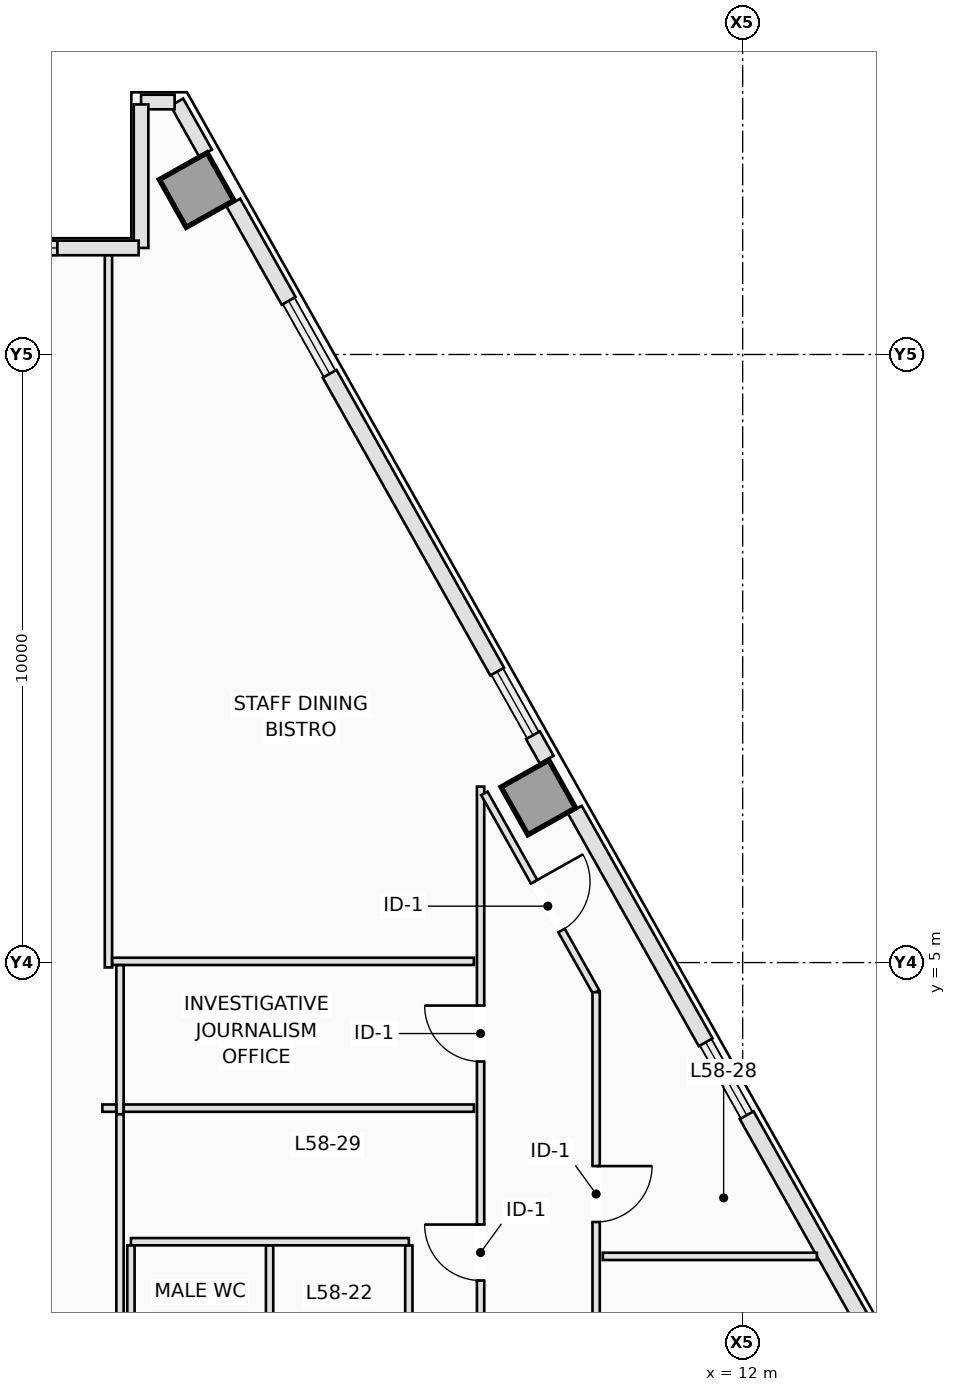
"""IFC4 building model, lengths in metres.
Left out: names, types, materials, properties, quantities, classifications, styles, units other than length and angle.
Written with IfcOpenShell. Run it as: python <this file> out.ifc"""

import sys

from ifc_helpers import new_model, si_unit, direction, frame, frame_2d, origin, origin_2d, place, context, subcontext, project, spatial, rectangle, extrude, element, fill, save


model = new_model("IFC4")
c1 = context("Model", 3, precision=1e-05, world=origin(), true_north=direction((0.0, 1.0)))
c2 = subcontext(c1, "Body", "Model", "MODEL_VIEW")
j1 = project(units=[si_unit("LENGTHUNIT", "METRE"), si_unit("PLANEANGLEUNIT", "RADIAN")], contexts=[c1])
p1 = place(None, origin())
s1 = spatial("IfcSite", under=j1, at=p1, CompositionType="ELEMENT")
p2 = place(p1, origin())
s2 = spatial("IfcBuilding", under=s1, at=p2, CompositionType="ELEMENT")
p3 = place(p2, frame((0.0, 0.0, 211.4)))
s3 = spatial("IfcBuildingStorey", under=s2, at=p3, CompositionType="ELEMENT", Elevation=211.4)
for number, where, z_axis, x_axis in (
    (1, (8.64, 7.715, 0.0), (0.0, 0.0, 1.0), (0.872, 0.49, 0.0)),
    (2, (3.021, 17.704, 0.0), (0.0, 0.0, 1.0), (0.872, 0.49, 0.0)),
):
    element("IfcColumn", number, at=place(p3, frame(where, z_axis=z_axis, x_axis=x_axis)), inside=s3, PredefinedType="COLUMN", context=c2, shape_type="SweptSolid", body=[
        extrude(rectangle(XDim=0.9, YDim=0.9, at=origin_2d()), origin(), (0.0, 0.0, 1.0), 3.5),
    ])
p4 = place(p3, frame((2.695, 19.149, 0.0), z_axis=(0.0, 0.0, 1.0), x_axis=(0.490345412687, -0.87152818443, 0.0)))
e3 = element("IfcWall", 3, at=p4, inside=s3, PredefinedType="STANDARD", context=c2, shape_type="SweptSolid", body=[
    extrude(rectangle(XDim=0.964, YDim=0.24, at=frame_2d((0.482, 0.0))), origin(), (0.0, 0.0, 1.0), 3.25),
])
p5 = place(p3, frame((3.624, 17.499, 0.0), z_axis=(0.0, 0.0, 1.0), x_axis=(0.490261239633, -0.871575537125, 0.0)))
e4 = element("IfcWall", 4, at=p5, inside=s3, PredefinedType="STANDARD", context=c2, shape_type="SweptSolid", body=[
    extrude(rectangle(XDim=1.855, YDim=0.26, at=frame_2d((0.928, 0.0))), origin(), (0.0, 0.0, 1.0), 3.25),
])
p6 = place(p3, frame((5.208, 14.682, 0.0), z_axis=(0.0, 0.0, 1.0), x_axis=(0.490240608828, -0.871587141631, 0.0)))
e5 = element("IfcWall", 5, at=p6, inside=s3, PredefinedType="STANDARD", context=c2, shape_type="SweptSolid", body=[
    extrude(rectangle(XDim=5.618, YDim=0.26, at=frame_2d((2.809, 0.0))), origin(), (0.0, 0.0, 1.0), 3.25),
])
p7 = place(p3, frame((8.552, 8.738, 0.0), z_axis=(0.0, 0.0, 1.0), x_axis=(0.490412424957, -0.871490478116, 0.0)))
e6 = element("IfcWall", 6, at=p7, inside=s3, PredefinedType="STANDARD", context=c2, shape_type="SweptSolid", body=[
    extrude(rectangle(XDim=0.46, YDim=0.26, at=frame_2d((0.23, 0.0))), origin(), (0.0, 0.0, 1.0), 3.25),
])
p8 = place(p3, frame((9.24, 7.514, 0.0), z_axis=(0.0, 0.0, 1.0), x_axis=(0.490237464814, -0.871588910033, 0.0)))
e7 = element("IfcWall", 7, at=p8, inside=s3, PredefinedType="STANDARD", context=c2, shape_type="SweptSolid", body=[
    extrude(rectangle(XDim=4.388, YDim=0.26, at=frame_2d((2.194, 0.0))), origin(), (0.0, 0.0, 1.0), 3.25),
])
p9 = place(p3, frame((12.066, 2.49, 0.0), z_axis=(0.0, 0.0, 1.0), x_axis=(0.490261239633, -0.871575537125, 0.0)))
e8 = element("IfcWall", 8, at=p9, inside=s3, PredefinedType="STANDARD", context=c2, shape_type="SweptSolid", body=[
    extrude(rectangle(XDim=4.388, YDim=0.26, at=frame_2d((2.194, 0.0))), origin(), (0.0, 0.0, 1.0), 3.25),
])
p10 = place(p3, frame((2.658, 19.152, 0.0), z_axis=(0.0, 0.0, 1.0), x_axis=(-1.0, 0.0, 0.0)))
e9 = element("IfcWall", 9, at=p10, inside=s3, PredefinedType="STANDARD", context=c2, shape_type="SweptSolid", body=[
    extrude(rectangle(XDim=0.552, YDim=0.24, at=frame_2d((0.276, 0.0))), origin(), (0.0, 0.0, 1.0), 3.25),
])
p11 = place(p3, frame((2.106, 19.112, 0.0), z_axis=(0.0, 0.0, 1.0), x_axis=(0.0, -1.0, 0.0)))
e10 = element("IfcWall", 10, at=p11, inside=s3, PredefinedType="STANDARD", context=c2, shape_type="SweptSolid", body=[
    extrude(rectangle(XDim=2.36, YDim=0.24, at=frame_2d((1.18, 0.0))), origin(), (0.0, 0.0, 1.0), 3.25),
])
p12 = place(p3, frame((2.066, 16.752, 0.0), z_axis=(0.0, 0.0, 1.0), x_axis=(-1.0, 0.0, 0.0)))
e11 = element("IfcWall", 11, at=p12, inside=s3, PredefinedType="STANDARD", context=c2, shape_type="SweptSolid", body=[
    extrude(rectangle(XDim=4.172, YDim=0.24, at=frame_2d((2.086, 0.0))), origin(), (0.0, 0.0, 1.0), 3.25),
])
p13 = place(p12, frame((1.336, 0.0, 0.9)))
e12 = element("IfcOpeningElement", 12, at=p13, cuts=e11, PredefinedType="OPENING", context=c2, shape_type="SweptSolid", body=[
    extrude(rectangle(XDim=1.5, YDim=1.95, at=frame_2d((0.75, 0.975))), frame((0.0, 0.13, 0.0), z_axis=(0.0, -1.0, 0.0), x_axis=(1.0, 0.0, 0.0)), (0.0, 0.0, 1.0), 0.26),
])
p14 = place(p3, frame((1.94, 0.41, 0.0), z_axis=(0.0, 0.0, 1.0), x_axis=(1.0, 0.0, 0.0)))
e13 = element("IfcWall", 13, at=p14, inside=s3, PredefinedType="PARTITIONING", context=c2, shape_type="SweptSolid", body=[
    extrude(rectangle(XDim=4.57, YDim=0.12, at=frame_2d((2.285, 0.0))), origin(), (0.0, 0.0, 1.0), 3.25),
])
for number, where, z_axis, x_axis in (
    (14, (1.94, -2.378, 0.0), (0.0, 0.0, 1.0), (0.0, 1.0, 0.0)),
    (15, (4.22, -2.378, 0.0), (0.0, 0.0, 1.0), (0.0, 1.0, 0.0)),
    (16, (6.51, -2.378, 0.0), (0.0, 0.0, 1.0), (0.0, 1.0, 0.0)),
):
    element("IfcWall", number, at=place(p3, frame(where, z_axis=z_axis, x_axis=x_axis)), inside=s3, PredefinedType="PARTITIONING", context=c2, shape_type="SweptSolid", body=[
        extrude(rectangle(XDim=2.726, YDim=0.12, at=frame_2d((1.363, 0.0))), origin(), (0.0, 0.0, 1.0), 3.25),
    ])
p15 = place(p3, frame((7.69, -2.338, 0.0), z_axis=(0.0, 0.0, 1.0), x_axis=(0.0, 1.0, 0.0)))
e17 = element("IfcWall", 17, at=p15, inside=s3, PredefinedType="PARTITIONING", context=c2, shape_type="SweptSolid", body=[
    extrude(rectangle(XDim=10.232, YDim=0.12, at=frame_2d((5.116, 0.0))), origin(), (0.0, 0.0, 1.0), 3.25),
])
p16 = place(p15, frame((5.711, 0.0, 0.0)))
e18 = element("IfcOpeningElement", 18, at=p16, cuts=e17, PredefinedType="OPENING", context=c2, shape_type="SweptSolid", body=[
    extrude(rectangle(XDim=0.92, YDim=2.12, at=frame_2d((0.46, 1.06))), frame((0.0, 0.07, 0.0), z_axis=(0.0, -1.0, 0.0), x_axis=(1.0, 0.0, 0.0)), (0.0, 0.0, 1.0), 0.14),
])
p17 = place(p15, frame((2.11, 0.0, 0.0)))
e19 = element("IfcOpeningElement", 19, at=p17, cuts=e17, PredefinedType="OPENING", context=c2, shape_type="SweptSolid", body=[
    extrude(rectangle(XDim=0.92, YDim=2.12, at=frame_2d((0.46, 1.06))), frame((0.0, 0.07, 0.0), z_axis=(0.0, -1.0, 0.0), x_axis=(1.0, 0.0, 0.0)), (0.0, 0.0, 1.0), 0.14),
])
p18 = place(p3, frame((7.752, 7.783, 0.0), z_axis=(0.0, 0.0, 1.0), x_axis=(0.490285973315, -0.871561623966, 0.0)))
e20 = element("IfcWall", 20, at=p18, inside=s3, PredefinedType="PARTITIONING", context=c2, shape_type="SweptSolid", body=[
    extrude(rectangle(XDim=3.749, YDim=0.12, at=frame_2d((1.875, 0.0))), origin(), (0.0, 0.0, 1.0), 3.25),
])
p19 = place(p18, frame((1.669, 0.0, 0.0)))
e21 = element("IfcOpeningElement", 21, at=p19, cuts=e20, PredefinedType="OPENING", context=c2, shape_type="SweptSolid", body=[
    extrude(rectangle(XDim=0.92, YDim=2.12, at=frame_2d((0.46, 1.06))), frame((0.0, 0.07, 0.0), z_axis=(0.0, -1.0, 0.0), x_axis=(1.0, 0.0, 0.0)), (0.0, 0.0, 1.0), 0.14),
])
p20 = place(p3, frame((9.59, 4.514, 0.0), z_axis=(0.0, 0.0, 1.0), x_axis=(0.0, -1.0, 0.0)))
e22 = element("IfcWall", 22, at=p20, inside=s3, PredefinedType="PARTITIONING", context=c2, shape_type="SweptSolid", body=[
    extrude(rectangle(XDim=6.914, YDim=0.12, at=frame_2d((3.457, 0.0))), origin(), (0.0, 0.0, 1.0), 3.25),
])
p21 = place(p20, frame((2.86, 0.0, 0.0)))
e23 = element("IfcOpeningElement", 23, at=p21, cuts=e22, PredefinedType="OPENING", context=c2, shape_type="SweptSolid", body=[
    extrude(rectangle(XDim=0.92, YDim=2.12, at=frame_2d((0.46, 1.06))), frame((0.0, 0.07, 0.0), z_axis=(0.0, -1.0, 0.0), x_axis=(1.0, 0.0, 0.0)), (0.0, 0.0, 1.0), 0.14),
])
p22 = place(p3, frame((1.57, 4.92, 0.0), z_axis=(0.0, 0.0, 1.0), x_axis=(0.0, 1.0, 0.0)))
e24 = element("IfcWall", 24, at=p22, inside=s3, PredefinedType="PARTITIONING", context=c2, shape_type="SweptSolid", body=[
    extrude(rectangle(XDim=11.71, YDim=0.12, at=frame_2d((5.855, 0.0))), origin(), (0.0, 0.0, 1.0), 3.25),
])
p23 = place(p3, frame((7.58, 5.02, 0.0), z_axis=(0.0, 0.0, 1.0), x_axis=(-1.0, 0.0, 0.0)))
e25 = element("IfcWall", 25, at=p23, inside=s3, PredefinedType="PARTITIONING", context=c2, shape_type="SweptSolid", body=[
    extrude(rectangle(XDim=5.948, YDim=0.12, at=frame_2d((2.974, 0.0))), origin(), (0.0, 0.0, 1.0), 3.25),
])
p24 = place(p3, frame((1.76, 4.958, 0.0), z_axis=(0.0, 0.0, 1.0), x_axis=(0.0, -1.0, 0.0)))
e26 = element("IfcWall", 26, at=p24, inside=s3, PredefinedType="PARTITIONING", context=c2, shape_type="SweptSolid", body=[
    extrude(rectangle(XDim=2.452, YDim=0.12, at=frame_2d((1.226, 0.0))), origin(), (0.0, 0.0, 1.0), 3.25),
])
p25 = place(p3, frame((1.76, 2.504, 0.0), z_axis=(0.0, 0.0, 1.0), x_axis=(0.0, -1.0, 0.0)))
e27 = element("IfcWall", 27, at=p25, inside=s3, PredefinedType="PARTITIONING", context=c2, shape_type="SweptSolid", body=[
    extrude(rectangle(XDim=4.794, YDim=0.12, at=frame_2d((2.397, 0.0))), origin(), (0.0, 0.0, 1.0), 3.25),
])
p26 = place(p3, frame((7.58, 2.606, 0.0), z_axis=(0.0, 0.0, 1.0), x_axis=(-1.0, 0.0, 0.0)))
e28 = element("IfcWall", 28, at=p26, inside=s3, PredefinedType="PARTITIONING", context=c2, shape_type="SweptSolid", body=[
    extrude(rectangle(XDim=5.758, YDim=0.12, at=frame_2d((2.879, 0.0))), origin(), (0.0, 0.0, 1.0), 2.943),
])
p27 = place(p3, frame((1.698, 2.606, 0.0), z_axis=(0.0, 0.0, 1.0), x_axis=(-1.0, 0.0, 0.0)))
e29 = element("IfcWall", 29, at=p27, inside=s3, PredefinedType="PARTITIONING", context=c2, shape_type="SweptSolid", body=[
    extrude(rectangle(XDim=0.228, YDim=0.12, at=frame_2d((0.114, 0.0))), origin(), (0.0, 0.0, 1.0), 2.943),
])
p28 = place(p3, frame((13.22, 0.169, 0.0), z_axis=(0.0, 0.0, 1.0), x_axis=(-1.0, 0.0, 0.0)))
e30 = element("IfcWall", 30, at=p28, inside=s3, PredefinedType="PARTITIONING", context=c2, shape_type="SweptSolid", body=[
    extrude(rectangle(XDim=3.521, YDim=0.12, at=frame_2d((1.76, 0.0))), origin(), (0.0, 0.0, 1.0), 3.25),
])
p29 = place(p13, origin())
e31 = element("IfcWindow", 31, at=p29, inside=s3, PartitioningType="SINGLE_PANEL", PredefinedType="WINDOW", context=c2, shape_type="SweptSolid", body=[
    extrude(rectangle(XDim=1.5, YDim=1.95, at=frame_2d((0.75, 0.975))), frame((0.0, 0.03, 0.0), z_axis=(0.0, -1.0, 0.0), x_axis=(1.0, 0.0, 0.0)), (0.0, 0.0, 1.0), 0.06),
])
fill(e12, e31)
p30 = place(p19, origin())
e32 = element("IfcDoor", 32, at=p30, inside=s3, OperationType="SINGLE_SWING_LEFT", PredefinedType="DOOR", context=c2, shape_type="SweptSolid", body=[
    extrude(rectangle(XDim=0.92, YDim=2.12, at=frame_2d((0.46, 1.06))), frame((0.0, 0.025, 0.0), z_axis=(0.0, -1.0, 0.0), x_axis=(1.0, 0.0, 0.0)), (0.0, 0.0, 1.0), 0.05),
])
fill(e21, e32)
p31 = place(p16, origin())
e33 = element("IfcDoor", 33, at=p31, inside=s3, OperationType="SINGLE_SWING_RIGHT", PredefinedType="DOOR", context=c2, shape_type="SweptSolid", body=[
    extrude(rectangle(XDim=0.92, YDim=2.12, at=frame_2d((0.46, 1.06))), frame((0.0, 0.025, 0.0), z_axis=(0.0, -1.0, 0.0), x_axis=(1.0, 0.0, 0.0)), (0.0, 0.0, 1.0), 0.05),
])
fill(e18, e33)
p32 = place(p21, origin())
e34 = element("IfcDoor", 34, at=p32, inside=s3, OperationType="SINGLE_SWING_LEFT", PredefinedType="DOOR", context=c2, shape_type="SweptSolid", body=[
    extrude(rectangle(XDim=0.92, YDim=2.12, at=frame_2d((0.46, 1.06))), frame((0.0, 0.025, 0.0), z_axis=(0.0, -1.0, 0.0), x_axis=(1.0, 0.0, 0.0)), (0.0, 0.0, 1.0), 0.05),
])
fill(e23, e34)
p33 = place(p17, origin())
e35 = element("IfcDoor", 35, at=p33, inside=s3, OperationType="SINGLE_SWING_RIGHT", PredefinedType="DOOR", context=c2, shape_type="SweptSolid", body=[
    extrude(rectangle(XDim=0.92, YDim=2.12, at=frame_2d((0.46, 1.06))), frame((0.0, 0.025, 0.0), z_axis=(0.0, -1.0, 0.0), x_axis=(1.0, 0.0, 0.0)), (0.0, 0.0, 1.0), 0.05),
])
fill(e19, e35)
save(model, sys.argv[1])
